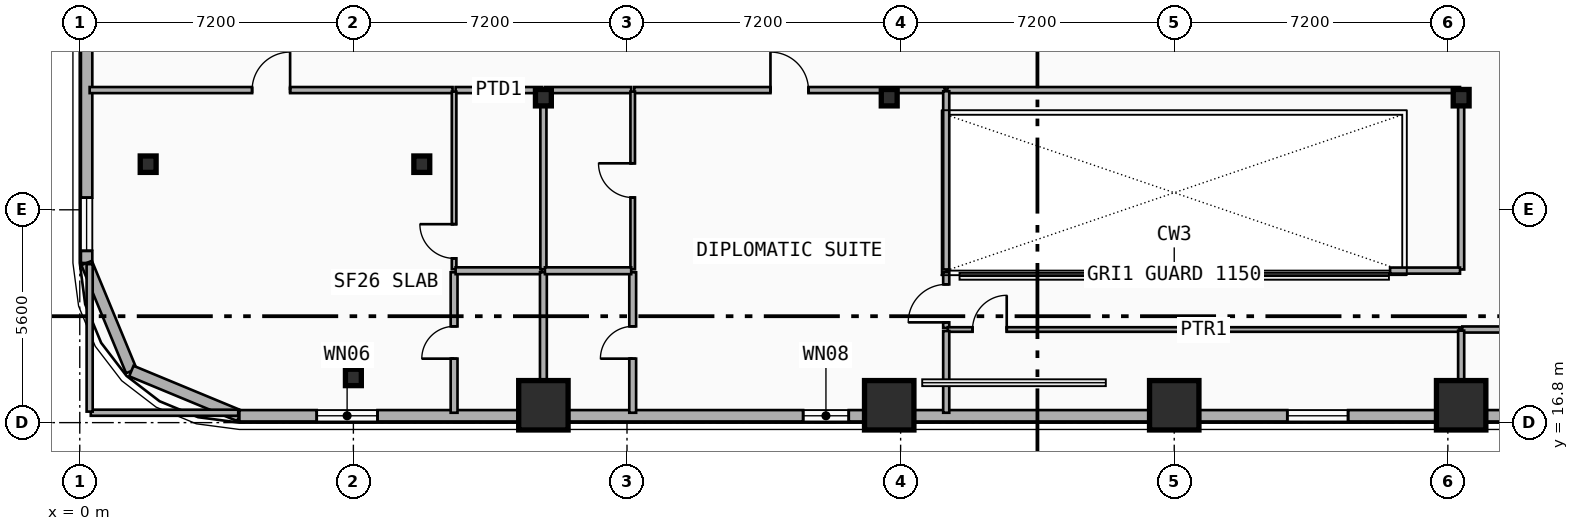
"""IFC4 building model, lengths in metres.
Left out: names, types, materials, properties, quantities, classifications, styles, units other than length and angle.
Written with IfcOpenShell. Run it as: python <this file> out.ifc"""

import sys

from ifc_helpers import new_model, si_unit, direction, frame, frame_2d, origin, origin_2d, place, context, subcontext, project, spatial, rectangle, i_section, extrude, element, fill, save


model = new_model("IFC4")
c1 = context("Model", 3, precision=1e-05, world=origin(), true_north=direction((0.0, 1.0)))
c2 = subcontext(c1, "Body", "Model", "MODEL_VIEW")
j1 = project(units=[si_unit("LENGTHUNIT", "METRE"), si_unit("PLANEANGLEUNIT", "RADIAN")], contexts=[c1])
p1 = place(None, origin())
s1 = spatial("IfcSite", under=j1, at=p1, CompositionType="ELEMENT")
p2 = place(p1, origin())
s2 = spatial("IfcBuilding", under=s1, at=p2, CompositionType="ELEMENT")
p3 = place(p2, frame((0.0, 0.0, 97.8)))
s3 = spatial("IfcBuildingStorey", under=s2, at=p3, CompositionType="ELEMENT", Elevation=97.8)
for number, where, z_axis, x_axis in (
    (1, (12.2, 25.35, 0.0), (0.0, 0.0, 1.0), (1.0, 0.0, 0.0)),
    (2, (21.3, 25.35, 0.0), (0.0, 0.0, 1.0), (1.0, 0.0, 0.0)),
    (3, (36.35, 25.35, 0.0), (0.0, 0.0, 1.0), (1.0, 0.0, 0.0)),
):
    element("IfcColumn", number, at=place(p3, frame(where, z_axis=z_axis, x_axis=x_axis)), inside=s3, PredefinedType="COLUMN", context=c2, shape_type="SweptSolid", body=[
        extrude(i_section(OverallWidth=0.418, OverallDepth=0.432, WebThickness=0.035, FlangeThickness=0.056, FilletRadius=0.015, at=origin_2d()), origin(), (0.0, 0.0, 1.0), 3.5),
    ])
for number, where, z_axis, x_axis in (
    (4, (12.2, 17.365, 0.0), (0.0, -0.09, 0.996), (1.0, 0.0, 0.0)),
    (5, (21.3, 17.365, 0.0), (0.0, -0.09, 0.996), (1.0, 0.0, 0.0)),
    (6, (28.8, 17.365, 0.0), (0.0, -0.09, 0.996), (1.0, 0.0, 0.0)),
    (7, (36.35, 17.365, 0.0), (0.0, -0.09, 0.996), (1.0, 0.0, 0.0)),
):
    element("IfcColumn", number, at=place(p3, frame(where, z_axis=z_axis, x_axis=x_axis)), inside=s3, PredefinedType="COLUMN", context=c2, shape_type="SweptSolid", body=[
        extrude(rectangle(XDim=1.3, YDim=1.3, at=origin_2d()), origin(), (0.0, 0.0, 1.0), 3.514),
    ])
for number, where, z_axis, x_axis in (
    (8, (9.0, 23.6, 0.0), (0.0, 0.0, 1.0), (1.0, 0.0, 0.0)),
    (9, (1.8, 23.6, 0.0), (0.0, 0.0, 1.0), (1.0, 0.0, 0.0)),
):
    element("IfcColumn", number, at=place(p3, frame(where, z_axis=z_axis, x_axis=x_axis)), inside=s3, PredefinedType="COLUMN", context=c2, shape_type="SweptSolid", body=[
        extrude(i_section(OverallWidth=0.418, OverallDepth=0.432, WebThickness=0.035, FlangeThickness=0.056, FilletRadius=0.015, at=origin_2d()), origin(), (0.0, 0.0, 1.0), 3.5),
    ])
p4 = place(p3, frame((7.2, 18.086, 0.0), z_axis=(0.0, -0.079891690793, 0.996803550226), x_axis=(1.0, 0.0, 0.0)))
e10 = element("IfcColumn", 10, at=p4, inside=s3, PredefinedType="COLUMN", context=c2, shape_type="SweptSolid", body=[
    extrude(i_section(OverallWidth=0.418, OverallDepth=0.432, WebThickness=0.035, FlangeThickness=0.056, FilletRadius=0.015, at=origin_2d()), origin(), (0.0, 0.0, 1.0), 3.511),
])
p5 = place(p3, frame((0.18, 21.0, 0.0), z_axis=(0.0, 0.0, 1.0), x_axis=(0.0, 1.0, 0.0)))
e11 = element("IfcWall", 11, at=p5, inside=s3, PredefinedType="SOLIDWALL", context=c2, shape_type="SweptSolid", body=[
    extrude(rectangle(XDim=18.0, YDim=0.3, at=frame_2d((9.0, 0.0))), origin(), (0.0, 0.0, 1.0), 3.24),
])
p6 = place(p5, frame((7.47, 0.0, 0.48)))
e12 = element("IfcOpeningElement", 12, at=p6, cuts=e11, PredefinedType="OPENING", context=c2, shape_type="SweptSolid", body=[
    extrude(rectangle(XDim=1.4, YDim=1.8, at=frame_2d((0.7, 0.9))), frame((0.0, 0.16, 0.0), z_axis=(0.0, -1.0, 0.0), x_axis=(1.0, 0.0, 0.0)), (0.0, 0.0, 1.0), 0.32),
])
p7 = place(p5, frame((12.509, 0.0, 0.48)))
e13 = element("IfcOpeningElement", 13, at=p7, cuts=e11, PredefinedType="OPENING", context=c2, shape_type="SweptSolid", body=[
    extrude(rectangle(XDim=1.4, YDim=1.8, at=frame_2d((0.7, 0.9))), frame((0.0, 0.16, 0.0), z_axis=(0.0, -1.0, 0.0), x_axis=(1.0, 0.0, 0.0)), (0.0, 0.0, 1.0), 0.32),
])
p8 = place(p5, frame((0.32, 0.0, 0.65)))
e14 = element("IfcOpeningElement", 14, at=p8, cuts=e11, PredefinedType="OPENING", context=c2, shape_type="SweptSolid", body=[
    extrude(rectangle(XDim=1.4, YDim=1.8, at=frame_2d((0.7, 0.9))), frame((0.0, 0.16, 0.0), z_axis=(0.0, -1.0, 0.0), x_axis=(1.0, 0.0, 0.0)), (0.0, 0.0, 1.0), 0.32),
])
for number, where, z_axis, x_axis in (
    (15, (1.357, 18.157, 0.0), (0.0, 0.0, 1.0), (-0.383, 0.924, 0.0)),
    (16, (4.2, 16.98, 0.0), (0.0, 0.0, 1.0), (-0.924, 0.383, 0.0)),
):
    element("IfcWall", number, at=place(p3, frame(where, z_axis=z_axis, x_axis=x_axis)), inside=s3, PredefinedType="SOLIDWALL", context=c2, shape_type="SweptSolid", body=[
        extrude(rectangle(XDim=3.077, YDim=0.3, at=frame_2d((1.538, 0.0))), origin(), (0.0, 0.0, 1.0), 3.24),
    ])
p9 = place(p3, frame((53.4, 16.98, 0.0), z_axis=(0.0, 0.0, 1.0), x_axis=(-1.0, 0.0, 0.0)))
e17 = element("IfcWall", 17, at=p9, inside=s3, PredefinedType="SOLIDWALL", context=c2, shape_type="SweptSolid", body=[
    extrude(rectangle(XDim=49.2, YDim=0.3, at=frame_2d((24.6, 0.0))), origin(), (0.0, 0.0, 1.0), 2.86),
])
p10 = place(p9, frame((45.565, 0.0, 0.48)))
e18 = element("IfcOpeningElement", 18, at=p10, cuts=e17, PredefinedType="OPENING", context=c2, shape_type="SweptSolid", body=[
    extrude(rectangle(XDim=1.6, YDim=1.95, at=frame_2d((0.8, 0.975))), frame((0.0, 0.16, 0.0), z_axis=(0.0, -1.0, 0.0), x_axis=(1.0, 0.0, 0.0)), (0.0, 0.0, 1.0), 0.32),
])
p11 = place(p9, frame((33.165, 0.0, 0.48)))
e19 = element("IfcOpeningElement", 19, at=p11, cuts=e17, PredefinedType="OPENING", context=c2, shape_type="SweptSolid", body=[
    extrude(rectangle(XDim=1.2, YDim=1.5, at=frame_2d((0.6, 0.75))), frame((0.0, 0.16, 0.0), z_axis=(0.0, -1.0, 0.0), x_axis=(1.0, 0.0, 0.0)), (0.0, 0.0, 1.0), 0.32),
])
p12 = place(p9, frame((20.025, 0.0, 0.73)))
e20 = element("IfcOpeningElement", 20, at=p12, cuts=e17, PredefinedType="OPENING", context=c2, shape_type="SweptSolid", body=[
    extrude(rectangle(XDim=1.6, YDim=1.95, at=frame_2d((0.8, 0.975))), frame((0.0, 0.16, 0.0), z_axis=(0.0, -1.0, 0.0), x_axis=(1.0, 0.0, 0.0)), (0.0, 0.0, 1.0), 0.32),
])
p13 = place(p9, frame((9.065, 0.0, 0.48)))
e21 = element("IfcOpeningElement", 21, at=p13, cuts=e17, PredefinedType="OPENING", context=c2, shape_type="SweptSolid", body=[
    extrude(rectangle(XDim=1.2, YDim=1.5, at=frame_2d((0.6, 0.75))), frame((0.0, 0.16, 0.0), z_axis=(0.0, -1.0, 0.0), x_axis=(1.0, 0.0, 0.0)), (0.0, 0.0, 1.0), 0.32),
])
p14 = place(p9, frame((2.035, 0.0, 0.48)))
e22 = element("IfcOpeningElement", 22, at=p14, cuts=e17, PredefinedType="OPENING", context=c2, shape_type="SweptSolid", body=[
    extrude(rectangle(XDim=1.6, YDim=1.95, at=frame_2d((0.8, 0.975))), frame((0.0, 0.16, 0.0), z_axis=(0.0, -1.0, 0.0), x_axis=(1.0, 0.0, 0.0)), (0.0, 0.0, 1.0), 0.32),
])
p15 = place(p3, frame((0.26, 25.55, 0.0), z_axis=(0.0, 0.0, 1.0), x_axis=(1.0, 0.0, 0.0)))
e23 = element("IfcWall", 23, at=p15, inside=s3, PredefinedType="PARTITIONING", context=c2, shape_type="SweptSolid", body=[
    extrude(rectangle(XDim=9.55, YDim=0.16, at=frame_2d((4.775, 0.0))), origin(), (0.0, 0.0, 1.0), 2.57),
])
p16 = place(p15, frame((4.275, 0.0, 0.0)))
e24 = element("IfcOpeningElement", 24, at=p16, cuts=e23, PredefinedType="OPENING", context=c2, shape_type="SweptSolid", body=[
    extrude(rectangle(XDim=1.0, YDim=2.15, at=frame_2d((0.5, 1.075))), frame((0.0, 0.09, 0.0), z_axis=(0.0, -1.0, 0.0), x_axis=(1.0, 0.0, 0.0)), (0.0, 0.0, 1.0), 0.18),
])
p17 = place(p3, frame((9.89, 25.55, 0.0), z_axis=(0.0, 0.0, 1.0), x_axis=(1.0, 0.0, 0.0)))
e25 = element("IfcWall", 25, at=p17, inside=s3, PredefinedType="PARTITIONING", context=c2, shape_type="SweptSolid", body=[
    extrude(rectangle(XDim=2.27, YDim=0.16, at=frame_2d((1.135, 0.0))), origin(), (0.0, 0.0, 1.0), 2.31),
])
p18 = place(p3, frame((14.59, 25.55, 0.0), z_axis=(0.0, 0.0, 1.0), x_axis=(1.0, 0.0, 0.0)))
e26 = element("IfcWall", 26, at=p18, inside=s3, PredefinedType="PARTITIONING", context=c2, shape_type="SweptSolid", body=[
    extrude(rectangle(XDim=8.17, YDim=0.16, at=frame_2d((4.085, 0.0))), origin(), (0.0, 0.0, 1.0), 2.31),
])
p19 = place(p18, frame((3.585, 0.0, 0.0)))
e27 = element("IfcOpeningElement", 27, at=p19, cuts=e26, PredefinedType="OPENING", context=c2, shape_type="SweptSolid", body=[
    extrude(rectangle(XDim=1.0, YDim=2.15, at=frame_2d((0.5, 1.075))), frame((0.0, 0.09, 0.0), z_axis=(0.0, -1.0, 0.0), x_axis=(1.0, 0.0, 0.0)), (0.0, 0.0, 1.0), 0.18),
])
p20 = place(p3, frame((12.24, 25.55, 0.0), z_axis=(0.0, 0.0, 1.0), x_axis=(1.0, 0.0, 0.0)))
e28 = element("IfcWall", 28, at=p20, inside=s3, PredefinedType="PARTITIONING", context=c2, shape_type="SweptSolid", body=[
    extrude(rectangle(XDim=2.27, YDim=0.16, at=frame_2d((1.135, 0.0))), origin(), (0.0, 0.0, 1.0), 2.31),
])
p21 = place(p3, frame((22.8, 19.29, 0.0), z_axis=(0.0, 0.0, 1.0), x_axis=(0.0, 1.0, 0.0)))
e29 = element("IfcWall", 29, at=p21, inside=s3, PredefinedType="PARTITIONING", context=c2, shape_type="SweptSolid", body=[
    extrude(rectangle(XDim=1.47, YDim=0.16, at=frame_2d((0.735, 0.0))), origin(), (0.0, 0.0, 1.0), 2.68),
])
p22 = place(p21, frame((0.148, 0.0, 0.0)))
e30 = element("IfcOpeningElement", 30, at=p22, cuts=e29, PredefinedType="OPENING", context=c2, shape_type="SweptSolid", body=[
    extrude(rectangle(XDim=1.0, YDim=2.15, at=frame_2d((0.5, 1.075))), frame((0.0, 0.09, 0.0), z_axis=(0.0, -1.0, 0.0), x_axis=(1.0, 0.0, 0.0)), (0.0, 0.0, 1.0), 0.18),
])
p23 = place(p3, frame((22.84, 19.25, 0.0), z_axis=(0.0, 0.0, 1.0), x_axis=(1.0, 0.0, 0.0)))
e31 = element("IfcWall", 31, at=p23, inside=s3, PredefinedType="PARTITIONING", context=c2, shape_type="SweptSolid", body=[
    extrude(rectangle(XDim=13.47, YDim=0.12, at=frame_2d((6.735, 0.0))), origin(), (0.0, 0.0, 1.0), 2.31),
])
p24 = place(p23, frame((0.652, 0.0, 0.0)))
e32 = element("IfcOpeningElement", 32, at=p24, cuts=e31, PredefinedType="OPENING", context=c2, shape_type="SweptSolid", body=[
    extrude(rectangle(XDim=0.9, YDim=2.1, at=frame_2d((0.45, 1.05))), frame((0.0, 0.07, 0.0), z_axis=(0.0, -1.0, 0.0), x_axis=(1.0, 0.0, 0.0)), (0.0, 0.0, 1.0), 0.14),
])
p25 = place(p3, frame((9.85, 17.06, 0.0), z_axis=(0.0, 0.0, 1.0), x_axis=(0.0, 1.0, 0.0)))
e33 = element("IfcWall", 33, at=p25, inside=s3, PredefinedType="PLUMBINGWALL", context=c2, shape_type="SweptSolid", body=[
    extrude(rectangle(XDim=3.696, YDim=0.18, at=frame_2d((1.848, 0.0))), origin(), (0.0, 0.0, 1.0), 2.86),
])
p26 = place(p25, frame((1.423, 0.0, 0.0)))
e34 = element("IfcOpeningElement", 34, at=p26, cuts=e33, PredefinedType="OPENING", context=c2, shape_type="SweptSolid", body=[
    extrude(rectangle(XDim=0.85, YDim=2.1, at=frame_2d((0.425, 1.05))), frame((0.0, 0.1, 0.0), z_axis=(0.0, -1.0, 0.0), x_axis=(1.0, 0.0, 0.0)), (0.0, 0.0, 1.0), 0.2),
])
p27 = place(p3, frame((9.85, 20.836, 0.0), z_axis=(0.0, 0.0, 1.0), x_axis=(0.0, 1.0, 0.0)))
e35 = element("IfcWall", 35, at=p27, inside=s3, PredefinedType="PARTITIONING", context=c2, shape_type="SweptSolid", body=[
    extrude(rectangle(XDim=4.674, YDim=0.12, at=frame_2d((2.337, 0.0))), origin(), (0.0, 0.0, 1.0), 2.72),
])
p28 = place(p27, frame((0.286, 0.0, 0.0)))
e36 = element("IfcOpeningElement", 36, at=p28, cuts=e35, PredefinedType="OPENING", context=c2, shape_type="SweptSolid", body=[
    extrude(rectangle(XDim=0.9, YDim=2.1, at=frame_2d((0.45, 1.05))), frame((0.0, 0.07, 0.0), z_axis=(0.0, -1.0, 0.0), x_axis=(1.0, 0.0, 0.0)), (0.0, 0.0, 1.0), 0.14),
])
p29 = place(p3, frame((9.89, 20.796, 0.0), z_axis=(0.0, 0.0, 1.0), x_axis=(1.0, 0.0, 0.0)))
e37 = element("IfcWall", 37, at=p29, inside=s3, PredefinedType="PLUMBINGWALL", context=c2, shape_type="SweptSolid", body=[
    extrude(rectangle(XDim=2.27, YDim=0.18, at=frame_2d((1.135, 0.0))), origin(), (0.0, 0.0, 1.0), 2.31),
])
p30 = place(p3, frame((12.2, 17.06, 0.0), z_axis=(0.0, 0.0, 1.0), x_axis=(0.0, 1.0, 0.0)))
e38 = element("IfcWall", 38, at=p30, inside=s3, PredefinedType="PLUMBINGWALL", context=c2, shape_type="SweptSolid", body=[
    extrude(rectangle(XDim=3.696, YDim=0.18, at=frame_2d((1.848, 0.0))), origin(), (0.0, 0.0, 1.0), 2.31),
])
p31 = place(p3, frame((12.2, 20.836, 0.0), z_axis=(0.0, 0.0, 1.0), x_axis=(0.0, 1.0, 0.0)))
e39 = element("IfcWall", 39, at=p31, inside=s3, PredefinedType="PARTITIONING", context=c2, shape_type="SweptSolid", body=[
    extrude(rectangle(XDim=4.674, YDim=0.16, at=frame_2d((2.337, 0.0))), origin(), (0.0, 0.0, 1.0), 2.31),
])
p32 = place(p3, frame((14.55, 17.06, 0.0), z_axis=(0.0, 0.0, 1.0), x_axis=(0.0, 1.0, 0.0)))
e40 = element("IfcWall", 40, at=p32, inside=s3, PredefinedType="PLUMBINGWALL", context=c2, shape_type="SweptSolid", body=[
    extrude(rectangle(XDim=3.696, YDim=0.18, at=frame_2d((1.848, 0.0))), origin(), (0.0, 0.0, 1.0), 2.82),
])
p33 = place(p32, frame((1.423, 0.0, 0.0)))
e41 = element("IfcOpeningElement", 41, at=p33, cuts=e40, PredefinedType="OPENING", context=c2, shape_type="SweptSolid", body=[
    extrude(rectangle(XDim=0.85, YDim=2.1, at=frame_2d((0.425, 1.05))), frame((0.0, 0.1, 0.0), z_axis=(0.0, -1.0, 0.0), x_axis=(1.0, 0.0, 0.0)), (0.0, 0.0, 1.0), 0.2),
])
p34 = place(p3, frame((14.55, 20.836, 0.0), z_axis=(0.0, 0.0, 1.0), x_axis=(0.0, 1.0, 0.0)))
e42 = element("IfcWall", 42, at=p34, inside=s3, PredefinedType="PARTITIONING", context=c2, shape_type="SweptSolid", body=[
    extrude(rectangle(XDim=4.674, YDim=0.12, at=frame_2d((2.337, 0.0))), origin(), (0.0, 0.0, 1.0), 2.82),
])
p35 = place(p34, frame((1.887, 0.0, 0.0)))
e43 = element("IfcOpeningElement", 43, at=p35, cuts=e42, PredefinedType="OPENING", context=c2, shape_type="SweptSolid", body=[
    extrude(rectangle(XDim=0.9, YDim=2.1, at=frame_2d((0.45, 1.05))), frame((0.0, 0.07, 0.0), z_axis=(0.0, -1.0, 0.0), x_axis=(1.0, 0.0, 0.0)), (0.0, 0.0, 1.0), 0.14),
])
p36 = place(p3, frame((22.8, 17.06, 0.0), z_axis=(0.0, 0.0, 1.0), x_axis=(0.0, 1.0, 0.0)))
e44 = element("IfcWall", 44, at=p36, inside=s3, PredefinedType="PARTITIONING", context=c2, shape_type="SweptSolid", body=[
    extrude(rectangle(XDim=2.15, YDim=0.16, at=frame_2d((1.075, 0.0))), origin(), (0.0, 0.0, 1.0), 2.86),
])
p37 = place(p3, frame((12.24, 20.796, 0.0), z_axis=(0.0, 0.0, 1.0), x_axis=(1.0, 0.0, 0.0)))
e45 = element("IfcWall", 45, at=p37, inside=s3, PredefinedType="PLUMBINGWALL", context=c2, shape_type="SweptSolid", body=[
    extrude(rectangle(XDim=2.27, YDim=0.18, at=frame_2d((1.135, 0.0))), origin(), (0.0, 0.0, 1.0), 2.31),
])
p38 = place(p3, frame((22.83, 25.55, 0.0), z_axis=(0.0, 0.0, 1.0), x_axis=(1.0, 0.0, 0.0)))
e46 = element("IfcWall", 46, at=p38, inside=s3, PredefinedType="PARTITIONING", context=c2, shape_type="SweptSolid", body=[
    extrude(rectangle(XDim=13.49, YDim=0.16, at=frame_2d((6.745, 0.0))), origin(), (0.0, 0.0, 1.0), 2.31),
])
p39 = place(p3, frame((36.38, 19.25, 0.0), z_axis=(0.0, 0.0, 1.0), x_axis=(1.0, 0.0, 0.0)))
e47 = element("IfcWall", 47, at=p39, inside=s3, PredefinedType="PARTITIONING", context=c2, shape_type="SweptSolid", body=[
    extrude(rectangle(XDim=1.94, YDim=0.16, at=frame_2d((0.97, 0.0))), origin(), (0.0, 0.0, 1.0), 2.31),
])
p40 = place(p3, frame((36.35, 20.83, 0.0), z_axis=(0.0, 0.0, 1.0), x_axis=(0.0, 1.0, 0.0)))
e48 = element("IfcWall", 48, at=p40, inside=s3, PredefinedType="PARTITIONING", context=c2, shape_type="SweptSolid", body=[
    extrude(rectangle(XDim=4.69, YDim=0.16, at=frame_2d((2.345, 0.0))), origin(), (0.0, 0.0, 1.0), 2.31),
])
p41 = place(p3, frame((34.48, 20.8, 0.0), z_axis=(0.0, 0.0, 1.0), x_axis=(1.0, 0.0, 0.0)))
e49 = element("IfcWall", 49, at=p41, inside=s3, PredefinedType="PARTITIONING", context=c2, shape_type="SweptSolid", body=[
    extrude(rectangle(XDim=1.84, YDim=0.16, at=frame_2d((0.92, 0.0))), origin(), (0.0, 0.0, 1.0), 2.31),
])
for number, where, z_axis, x_axis in (
    (50, (0.29, 17.06, 0.0), (0.0, 0.0, 1.0), (1.0, 0.0, 0.0)),
    (51, (0.26, 17.09, 0.0), (0.0, 0.0, 1.0), (0.0, 1.0, 0.0)),
):
    element("IfcWall", number, at=place(p3, frame(where, z_axis=z_axis, x_axis=x_axis)), inside=s3, PredefinedType="PARTITIONING", context=c2, shape_type="SweptSolid", body=[
        extrude(rectangle(XDim=3.88, YDim=0.16, at=frame_2d((1.94, 0.0))), origin(), (0.0, 0.0, 1.0), 3.24),
    ])
p42 = place(p3, frame((22.8, 20.83, 0.0), z_axis=(0.0, 0.0, 1.0), x_axis=(0.0, 1.0, 0.0)))
e52 = element("IfcWall", 52, at=p42, inside=s3, PredefinedType="PARTITIONING", context=c2, shape_type="SweptSolid", body=[
    extrude(rectangle(XDim=4.69, YDim=0.16, at=frame_2d((2.345, 0.0))), origin(), (0.0, 0.0, 1.0), 2.68),
])
p43 = place(p3, frame((36.35, 17.09, 0.0), z_axis=(0.0, 0.0, 1.0), x_axis=(0.0, 1.0, 0.0)))
e53 = element("IfcWall", 53, at=p43, inside=s3, PredefinedType="PARTITIONING", context=c2, shape_type="SweptSolid", body=[
    extrude(rectangle(XDim=2.13, YDim=0.16, at=frame_2d((1.065, 0.0))), origin(), (0.0, 0.0, 1.0), 2.31),
])
p44 = place(p8, origin())
e54 = element("IfcWindow", 54, at=p44, inside=s3, PartitioningType="SINGLE_PANEL", PredefinedType="WINDOW", context=c2, shape_type="SweptSolid", body=[
    extrude(rectangle(XDim=1.4, YDim=1.8, at=frame_2d((0.7, 0.9))), frame((0.0, 0.03, 0.0), z_axis=(0.0, -1.0, 0.0), x_axis=(1.0, 0.0, 0.0)), (0.0, 0.0, 1.0), 0.06),
])
fill(e14, e54)
p45 = place(p10, origin())
e55 = element("IfcWindow", 55, at=p45, inside=s3, PartitioningType="SINGLE_PANEL", PredefinedType="WINDOW", context=c2, shape_type="SweptSolid", body=[
    extrude(rectangle(XDim=1.6, YDim=1.95, at=frame_2d((0.8, 0.975))), frame((0.0, 0.03, 0.0), z_axis=(0.0, -1.0, 0.0), x_axis=(1.0, 0.0, 0.0)), (0.0, 0.0, 1.0), 0.06),
])
fill(e18, e55)
p46 = place(p11, origin())
e56 = element("IfcWindow", 56, at=p46, inside=s3, PartitioningType="SINGLE_PANEL", PredefinedType="WINDOW", context=c2, shape_type="SweptSolid", body=[
    extrude(rectangle(XDim=1.2, YDim=1.5, at=frame_2d((0.6, 0.75))), frame((0.0, 0.03, 0.0), z_axis=(0.0, -1.0, 0.0), x_axis=(1.0, 0.0, 0.0)), (0.0, 0.0, 1.0), 0.06),
])
fill(e19, e56)
p47 = place(p12, origin())
e57 = element("IfcWindow", 57, at=p47, inside=s3, PartitioningType="SINGLE_PANEL", PredefinedType="WINDOW", context=c2, shape_type="SweptSolid", body=[
    extrude(rectangle(XDim=1.6, YDim=1.95, at=frame_2d((0.8, 0.975))), frame((0.0, 0.03, 0.0), z_axis=(0.0, -1.0, 0.0), x_axis=(1.0, 0.0, 0.0)), (0.0, 0.0, 1.0), 0.06),
])
fill(e20, e57)
p48 = place(p16, origin())
e58 = element("IfcDoor", 58, at=p48, inside=s3, OperationType="SINGLE_SWING_RIGHT", PredefinedType="DOOR", context=c2, shape_type="SweptSolid", body=[
    extrude(rectangle(XDim=1.0, YDim=2.15, at=frame_2d((0.5, 1.075))), frame((0.0, 0.025, 0.0), z_axis=(0.0, -1.0, 0.0), x_axis=(1.0, 0.0, 0.0)), (0.0, 0.0, 1.0), 0.05),
])
fill(e24, e58)
p49 = place(p19, origin())
e59 = element("IfcDoor", 59, at=p49, inside=s3, OperationType="SINGLE_SWING_LEFT", PredefinedType="DOOR", context=c2, shape_type="SweptSolid", body=[
    extrude(rectangle(XDim=1.0, YDim=2.15, at=frame_2d((0.5, 1.075))), frame((0.0, 0.025, 0.0), z_axis=(0.0, -1.0, 0.0), x_axis=(1.0, 0.0, 0.0)), (0.0, 0.0, 1.0), 0.05),
])
fill(e27, e59)
p50 = place(p22, origin())
e60 = element("IfcDoor", 60, at=p50, inside=s3, OperationType="SINGLE_SWING_LEFT", PredefinedType="DOOR", context=c2, shape_type="SweptSolid", body=[
    extrude(rectangle(XDim=1.0, YDim=2.15, at=frame_2d((0.5, 1.075))), frame((0.0, 0.025, 0.0), z_axis=(0.0, -1.0, 0.0), x_axis=(1.0, 0.0, 0.0)), (0.0, 0.0, 1.0), 0.05),
])
fill(e30, e60)
p51 = place(p24, origin())
e61 = element("IfcDoor", 61, at=p51, inside=s3, OperationType="SINGLE_SWING_RIGHT", PredefinedType="DOOR", context=c2, shape_type="SweptSolid", body=[
    extrude(rectangle(XDim=0.9, YDim=2.1, at=frame_2d((0.45, 1.05))), frame((0.0, 0.025, 0.0), z_axis=(0.0, -1.0, 0.0), x_axis=(1.0, 0.0, 0.0)), (0.0, 0.0, 1.0), 0.05),
])
fill(e32, e61)
p52 = place(p26, origin())
e62 = element("IfcDoor", 62, at=p52, inside=s3, OperationType="SINGLE_SWING_LEFT", PredefinedType="DOOR", context=c2, shape_type="SweptSolid", body=[
    extrude(rectangle(XDim=0.85, YDim=2.1, at=frame_2d((0.425, 1.05))), frame((0.0, 0.025, 0.0), z_axis=(0.0, -1.0, 0.0), x_axis=(1.0, 0.0, 0.0)), (0.0, 0.0, 1.0), 0.05),
])
fill(e34, e62)
p53 = place(p28, origin())
e63 = element("IfcDoor", 63, at=p53, inside=s3, OperationType="SINGLE_SWING_RIGHT", PredefinedType="DOOR", context=c2, shape_type="SweptSolid", body=[
    extrude(rectangle(XDim=0.9, YDim=2.1, at=frame_2d((0.45, 1.05))), frame((0.0, 0.025, 0.0), z_axis=(0.0, -1.0, 0.0), x_axis=(1.0, 0.0, 0.0)), (0.0, 0.0, 1.0), 0.05),
])
fill(e36, e63)
p54 = place(p33, origin())
e64 = element("IfcDoor", 64, at=p54, inside=s3, OperationType="SINGLE_SWING_LEFT", PredefinedType="DOOR", context=c2, shape_type="SweptSolid", body=[
    extrude(rectangle(XDim=0.85, YDim=2.1, at=frame_2d((0.425, 1.05))), frame((0.0, 0.025, 0.0), z_axis=(0.0, -1.0, 0.0), x_axis=(1.0, 0.0, 0.0)), (0.0, 0.0, 1.0), 0.05),
])
fill(e41, e64)
p55 = place(p35, origin())
e65 = element("IfcDoor", 65, at=p55, inside=s3, OperationType="SINGLE_SWING_RIGHT", PredefinedType="DOOR", context=c2, shape_type="SweptSolid", body=[
    extrude(rectangle(XDim=0.9, YDim=2.1, at=frame_2d((0.45, 1.05))), frame((0.0, 0.025, 0.0), z_axis=(0.0, -1.0, 0.0), x_axis=(1.0, 0.0, 0.0)), (0.0, 0.0, 1.0), 0.05),
])
fill(e43, e65)
save(model, sys.argv[1])
